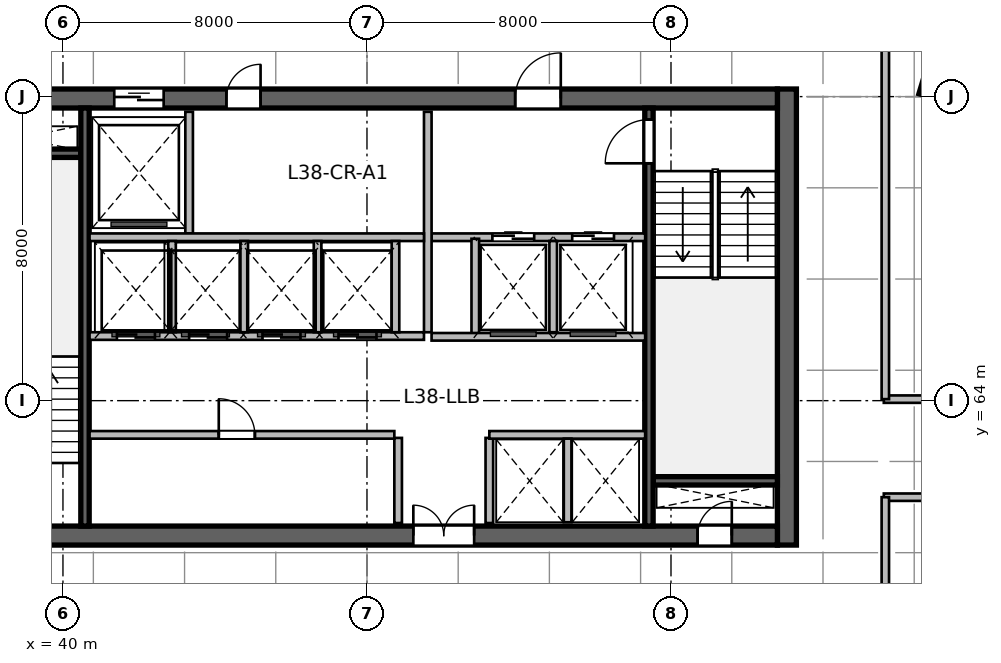
"""IFC4 building model, lengths in metres.
Left out: names, types, materials, properties, quantities, classifications, styles, units other than length and angle.
Written with IfcOpenShell. Run it as: python <this file> out.ifc"""

import sys

from ifc_helpers import new_model, si_unit, direction, frame, frame_2d, origin, origin_2d, place, context, subcontext, project, spatial, rectangle, extrude, source, transform, mapped, element, fill, save


model = new_model("IFC4")
c1 = context("Model", 3, precision=1e-05, world=origin(), true_north=direction((0.0, 1.0)))
c2 = subcontext(c1, "Body", "Model", "MODEL_VIEW")
j1 = project(units=[si_unit("LENGTHUNIT", "METRE"), si_unit("PLANEANGLEUNIT", "RADIAN")], contexts=[c1])
p1 = place(None, origin())
s1 = spatial("IfcSite", under=j1, at=p1, CompositionType="ELEMENT")
p2 = place(p1, origin())
s2 = spatial("IfcBuilding", under=s1, at=p2, CompositionType="ELEMENT")
p3 = place(p2, frame((0.0, 0.0, 158.4)))
s3 = spatial("IfcBuildingStorey", under=s2, at=p3, CompositionType="ELEMENT", Elevation=158.4)
m1 = source(origin(), c2, "Body", "SweptSolid", [
    extrude(rectangle(XDim=12.0, YDim=0.5, at=frame_2d((6.0, 0.0))), origin(), (0.0, 0.0, 1.0), 3.9),
])
p4 = place(p3, frame((59.05, 60.2, 0.0), z_axis=(0.0, 0.0, 1.0), x_axis=(0.0, 1.0, 0.0)))
e1 = element("IfcWall", 1, at=p4, inside=s3, PredefinedType="SHEAR", context=c2, shape_type="MappedRepresentation", body=[
    mapped(m1, transform((0.0, 0.0, 0.0), scale=1.0)),
])
m2 = source(origin(), c2, "Body", "SweptSolid", [
    extrude(rectangle(XDim=21.6, YDim=0.5, at=frame_2d((10.8, 0.0))), origin(), (0.0, 0.0, 1.0), 3.9),
])
p5 = place(p3, frame((37.2, 60.45, 0.0), z_axis=(0.0, 0.0, 1.0), x_axis=(1.0, 0.0, 0.0)))
e2 = element("IfcWall", 2, at=p5, inside=s3, PredefinedType="SHEAR", context=c2, shape_type="MappedRepresentation", body=[
    mapped(m2, transform((0.0, 0.0, 0.0), scale=1.0)),
])
p6 = place(p5, frame((1.1, 0.0, 0.0)))
e3 = element("IfcOpeningElement", 3, at=p6, cuts=e2, PredefinedType="OPENING", context=c2, shape_type="SweptSolid", body=[
    extrude(rectangle(XDim=1.15, YDim=2.15, at=frame_2d((0.575, 1.075))), frame((0.0, 0.26, 0.0), z_axis=(0.0, -1.0, 0.0), x_axis=(1.0, 0.0, 0.0)), (0.0, 0.0, 1.0), 0.52),
])
p7 = place(p5, frame((19.5, 0.0, 0.0)))
e4 = element("IfcOpeningElement", 4, at=p7, cuts=e2, PredefinedType="OPENING", context=c2, shape_type="SweptSolid", body=[
    extrude(rectangle(XDim=0.9, YDim=2.1, at=frame_2d((0.45, 1.05))), frame((0.0, 0.26, 0.0), z_axis=(0.0, -1.0, 0.0), x_axis=(1.0, 0.0, 0.0)), (0.0, 0.0, 1.0), 0.52),
])
p8 = place(p5, frame((12.02, 0.0, 0.0)))
e5 = element("IfcOpeningElement", 5, at=p8, cuts=e2, PredefinedType="OPENING", context=c2, shape_type="SweptSolid", body=[
    extrude(rectangle(XDim=1.6, YDim=2.15, at=frame_2d((0.8, 1.075))), frame((0.0, 0.26, 0.0), z_axis=(0.0, -1.0, 0.0), x_axis=(1.0, 0.0, 0.0)), (0.0, 0.0, 1.0), 0.52),
])
p9 = place(p3, frame((37.2, 71.95, 0.0), z_axis=(0.0, 0.0, 1.0), x_axis=(1.0, 0.0, 0.0)))
e6 = element("IfcWall", 6, at=p9, inside=s3, PredefinedType="SHEAR", context=c2, shape_type="MappedRepresentation", body=[
    mapped(m2, transform((0.0, 0.0, 0.0), scale=1.0)),
])
p10 = place(p9, frame((1.2, 0.0, 0.0)))
e7 = element("IfcOpeningElement", 7, at=p10, cuts=e6, PredefinedType="OPENING", context=c2, shape_type="SweptSolid", body=[
    extrude(rectangle(XDim=0.9, YDim=2.1, at=frame_2d((0.45, 1.05))), frame((0.0, 0.26, 0.0), z_axis=(0.0, -1.0, 0.0), x_axis=(1.0, 0.0, 0.0)), (0.0, 0.0, 1.0), 0.52),
])
p11 = place(p9, frame((14.7, 0.0, 0.0)))
e8 = element("IfcOpeningElement", 8, at=p11, cuts=e6, PredefinedType="OPENING", context=c2, shape_type="SweptSolid", body=[
    extrude(rectangle(XDim=1.2, YDim=2.15, at=frame_2d((0.6, 1.075))), frame((0.0, 0.26, 0.0), z_axis=(0.0, -1.0, 0.0), x_axis=(1.0, 0.0, 0.0)), (0.0, 0.0, 1.0), 0.52),
])
p12 = place(p9, frame((4.15, 0.0, 0.0)))
e9 = element("IfcOpeningElement", 9, at=p12, cuts=e6, PredefinedType="OPENING", context=c2, shape_type="SweptSolid", body=[
    extrude(rectangle(XDim=1.3, YDim=2.15, at=frame_2d((0.65, 1.075))), frame((0.0, 0.26, 0.0), z_axis=(0.0, -1.0, 0.0), x_axis=(1.0, 0.0, 0.0)), (0.0, 0.0, 1.0), 0.52),
])
p13 = place(p9, frame((7.1, 0.0, 0.0)))
e10 = element("IfcOpeningElement", 10, at=p13, cuts=e6, PredefinedType="OPENING", context=c2, shape_type="SweptSolid", body=[
    extrude(rectangle(XDim=0.9, YDim=2.1, at=frame_2d((0.45, 1.05))), frame((0.0, 0.26, 0.0), z_axis=(0.0, -1.0, 0.0), x_axis=(1.0, 0.0, 0.0)), (0.0, 0.0, 1.0), 0.52),
])
m3 = source(origin(), c2, "Body", "SweptSolid", [
    extrude(rectangle(XDim=3.27, YDim=0.22, at=frame_2d((1.635, 0.0))), origin(), (0.0, 0.0, 1.0), 3.9),
])
for number, where, z_axis, x_axis in (
    (11, (37.2, 70.51, 0.0), (0.0, 0.0, 1.0), (1.0, 0.0, 0.0)),
    (12, (55.53, 61.89, 0.0), (0.0, 0.0, 1.0), (1.0, 0.0, 0.0)),
):
    element("IfcWall", number, at=place(p3, frame(where, z_axis=z_axis, x_axis=x_axis)), inside=s3, PredefinedType="SHEAR", context=c2, shape_type="MappedRepresentation", body=[
        mapped(m3, transform((0.0, 0.0, 0.0), scale=1.0)),
    ])
m4 = source(origin(), c2, "Body", "SweptSolid", [
    extrude(rectangle(XDim=11.0, YDim=0.22, at=frame_2d((5.5, 0.0))), origin(), (0.0, 0.0, 1.0), 3.9),
])
p14 = place(p3, frame((40.58, 60.7, 0.0), z_axis=(0.0, 0.0, 1.0), x_axis=(0.0, 1.0, 0.0)))
e13 = element("IfcWall", 13, at=p14, inside=s3, PredefinedType="SHEAR", context=c2, shape_type="MappedRepresentation", body=[
    mapped(m4, transform((0.0, 0.0, 0.0), scale=1.0)),
])
p15 = place(p3, frame((55.42, 60.7, 0.0), z_axis=(0.0, 0.0, 1.0), x_axis=(0.0, 1.0, 0.0)))
e14 = element("IfcWall", 14, at=p15, inside=s3, PredefinedType="SHEAR", context=c2, shape_type="MappedRepresentation", body=[
    mapped(m4, transform((0.0, 0.0, 0.0), scale=1.0)),
])
p16 = place(p15, frame((9.545, 0.0, 0.0)))
e15 = element("IfcOpeningElement", 15, at=p16, cuts=e14, PredefinedType="OPENING", context=c2, shape_type="SweptSolid", body=[
    extrude(rectangle(XDim=1.15, YDim=2.15, at=frame_2d((0.575, 1.075))), frame((0.0, 0.12, 0.0), z_axis=(0.0, -1.0, 0.0), x_axis=(1.0, 0.0, 0.0)), (0.0, 0.0, 1.0), 0.24),
])
m5 = source(origin(), c2, "Body", "SweptSolid", [
    extrude(rectangle(XDim=1.1, YDim=1.1, at=origin_2d()), origin(), (0.0, 0.0, 1.0), 3.9),
])
p17 = place(p3, frame((63.209, 72.442, 0.0), z_axis=(0.0, 0.0, 1.0), x_axis=(0.288697611798, 0.957420330337, 0.0)))
e16 = element("IfcColumn", 16, at=p17, inside=s3, PredefinedType="COLUMN", context=c2, shape_type="MappedRepresentation", body=[
    mapped(m5, transform((0.0, 0.0, 0.0), scale=1.0)),
])
m6 = source(origin(), c2, "Body", "SweptSolid", [
    extrude(rectangle(XDim=2.24, YDim=0.2, at=frame_2d((1.12, 0.0))), origin(), (0.0, 0.0, 1.0), 3.65),
])
for number, where, z_axis, x_axis in (
    (17, (48.82, 60.78, 0.0), (0.0, 0.0, 1.0), (0.0, 1.0, 0.0)),
    (18, (51.22, 60.78, 0.0), (0.0, 0.0, 1.0), (0.0, 1.0, 0.0)),
):
    element("IfcWall", number, at=place(p3, frame(where, z_axis=z_axis, x_axis=x_axis)), inside=s3, PredefinedType="SOLIDWALL", context=c2, shape_type="MappedRepresentation", body=[
        mapped(m6, transform((0.0, 0.0, 0.0), scale=1.0)),
    ])
m7 = source(origin(), c2, "Body", "SweptSolid", [
    extrude(rectangle(XDim=5.62, YDim=0.2, at=frame_2d((2.81, 0.0))), origin(), (0.0, 0.0, 1.0), 3.65),
])
p18 = place(p3, frame((49.7, 68.3, 0.0), z_axis=(0.0, 0.0, 1.0), x_axis=(1.0, 0.0, 0.0)))
e19 = element("IfcWall", 19, at=p18, inside=s3, PredefinedType="SOLIDWALL", context=c2, shape_type="MappedRepresentation", body=[
    mapped(m7, transform((0.0, 0.0, 0.0), scale=1.0)),
])
p19 = place(p18, frame((1.6, 0.0, 0.0)))
e20 = element("IfcOpeningElement", 20, at=p19, cuts=e19, PredefinedType="OPENING", context=c2, shape_type="SweptSolid", body=[
    extrude(rectangle(XDim=1.1, YDim=2.15, at=frame_2d((0.55, 1.075))), frame((0.0, 0.11, 0.0), z_axis=(0.0, -1.0, 0.0), x_axis=(1.0, 0.0, 0.0)), (0.0, 0.0, 1.0), 0.22),
])
p20 = place(p18, frame((3.7, 0.0, 0.0)))
e21 = element("IfcOpeningElement", 21, at=p20, cuts=e19, PredefinedType="OPENING", context=c2, shape_type="SweptSolid", body=[
    extrude(rectangle(XDim=1.1, YDim=2.15, at=frame_2d((0.55, 1.075))), frame((0.0, 0.11, 0.0), z_axis=(0.0, -1.0, 0.0), x_axis=(1.0, 0.0, 0.0)), (0.0, 0.0, 1.0), 0.22),
])
m8 = source(origin(), c2, "Body", "SweptSolid", [
    extrude(rectangle(XDim=5.8, YDim=0.2, at=frame_2d((2.9, 0.0))), origin(), (0.0, 0.0, 1.0), 3.65),
])
p21 = place(p3, frame((49.6, 65.8, 0.0), z_axis=(0.0, 0.0, 1.0), x_axis=(0.0, 1.0, 0.0)))
e22 = element("IfcWall", 22, at=p21, inside=s3, PredefinedType="SOLIDWALL", context=c2, shape_type="MappedRepresentation", body=[
    mapped(m8, transform((0.0, 0.0, 0.0), scale=1.0)),
])
m9 = source(origin(), c2, "Body", "SweptSolid", [
    extrude(rectangle(XDim=2.58, YDim=0.2, at=frame_2d((1.29, 0.0))), origin(), (0.0, 0.0, 1.0), 3.65),
])
p22 = place(p3, frame((50.85, 65.68, 0.0), z_axis=(0.0, 0.0, 1.0), x_axis=(0.0, 1.0, 0.0)))
e23 = element("IfcWall", 23, at=p22, inside=s3, PredefinedType="SOLIDWALL", context=c2, shape_type="MappedRepresentation", body=[
    mapped(m9, transform((0.0, 0.0, 0.0), scale=1.0)),
])
m10 = source(origin(), c2, "Body", "SweptSolid", [
    extrude(rectangle(XDim=2.4, YDim=0.2, at=frame_2d((1.2, 0.0))), origin(), (0.0, 0.0, 1.0), 3.65),
])
p23 = place(p3, frame((52.9, 65.8, 0.0), z_axis=(0.0, 0.0, 1.0), x_axis=(0.0, 1.0, 0.0)))
e24 = element("IfcWall", 24, at=p23, inside=s3, PredefinedType="SOLIDWALL", context=c2, shape_type="MappedRepresentation", body=[
    mapped(m10, transform((0.0, 0.0, 0.0), scale=1.0)),
])
p24 = place(p3, frame((49.7, 65.68, 0.0), z_axis=(0.0, 0.0, 1.0), x_axis=(1.0, 0.0, 0.0)))
e25 = element("IfcWall", 25, at=p24, inside=s3, PredefinedType="SOLIDWALL", context=c2, shape_type="MappedRepresentation", body=[
    mapped(m7, transform((0.0, 0.0, 0.0), scale=1.0)),
])
m11 = source(origin(), c2, "Body", "SweptSolid", [
    extrude(rectangle(XDim=3.2, YDim=0.2, at=frame_2d((1.6, 0.0))), origin(), (0.0, 0.0, 1.0), 3.65),
])
p25 = place(p3, frame((43.32, 68.4, 0.0), z_axis=(0.0, 0.0, 1.0), x_axis=(0.0, 1.0, 0.0)))
e26 = element("IfcWall", 26, at=p25, inside=s3, PredefinedType="SOLIDWALL", context=c2, shape_type="MappedRepresentation", body=[
    mapped(m11, transform((0.0, 0.0, 0.0), scale=1.0)),
])
m12 = source(origin(), c2, "Body", "SweptSolid", [
    extrude(rectangle(XDim=8.8, YDim=0.2, at=frame_2d((4.4, 0.0))), origin(), (0.0, 0.0, 1.0), 3.65),
])
p26 = place(p3, frame((40.7, 68.3, 0.0), z_axis=(0.0, 0.0, 1.0), x_axis=(1.0, 0.0, 0.0)))
e27 = element("IfcWall", 27, at=p26, inside=s3, PredefinedType="SOLIDWALL", context=c2, shape_type="MappedRepresentation", body=[
    mapped(m12, transform((0.0, 0.0, 0.0), scale=1.0)),
])
m13 = source(origin(), c2, "Body", "SweptSolid", [
    extrude(rectangle(XDim=8.02, YDim=0.2, at=frame_2d((4.01, 0.0))), origin(), (0.0, 0.0, 1.0), 3.65),
])
p27 = place(p3, frame((40.7, 63.1, 0.0), z_axis=(0.0, 0.0, 1.0), x_axis=(1.0, 0.0, 0.0)))
e28 = element("IfcWall", 28, at=p27, inside=s3, PredefinedType="SOLIDWALL", context=c2, shape_type="MappedRepresentation", body=[
    mapped(m13, transform((0.0, 0.0, 0.0), scale=1.0)),
])
p28 = place(p27, frame((3.4, 0.0, 0.0)))
e29 = element("IfcOpeningElement", 29, at=p28, cuts=e28, PredefinedType="OPENING", context=c2, shape_type="SweptSolid", body=[
    extrude(rectangle(XDim=0.95, YDim=2.15, at=frame_2d((0.475, 1.075))), frame((0.0, 0.11, 0.0), z_axis=(0.0, -1.0, 0.0), x_axis=(1.0, 0.0, 0.0)), (0.0, 0.0, 1.0), 0.22),
])
m14 = source(origin(), c2, "Body", "SweptSolid", [
    extrude(rectangle(XDim=4.1, YDim=0.2, at=frame_2d((2.05, 0.0))), origin(), (0.0, 0.0, 1.0), 3.65),
])
p29 = place(p3, frame((51.22, 63.1, 0.0), z_axis=(0.0, 0.0, 1.0), x_axis=(1.0, 0.0, 0.0)))
e30 = element("IfcWall", 30, at=p29, inside=s3, PredefinedType="SOLIDWALL", context=c2, shape_type="MappedRepresentation", body=[
    mapped(m14, transform((0.0, 0.0, 0.0), scale=1.0)),
])
m15 = source(origin(), c2, "Body", "SweptSolid", [
    extrude(rectangle(XDim=2.2, YDim=0.2, at=frame_2d((1.1, 0.0))), origin(), (0.0, 0.0, 1.0), 3.65),
])
p30 = place(p3, frame((53.28, 60.8, 0.0), z_axis=(0.0, 0.0, 1.0), x_axis=(0.0, 1.0, 0.0)))
e31 = element("IfcWall", 31, at=p30, inside=s3, PredefinedType="SOLIDWALL", context=c2, shape_type="MappedRepresentation", body=[
    mapped(m15, transform((0.0, 0.0, 0.0), scale=1.0)),
])
p31 = place(p3, frame((40.7, 65.7, 0.0), z_axis=(0.0, 0.0, 1.0), x_axis=(1.0, 0.0, 0.0)))
e32 = element("IfcWall", 32, at=p31, inside=s3, PredefinedType="SOLIDWALL", context=c2, shape_type="MappedRepresentation", body=[
    mapped(m12, transform((0.0, 0.0, 0.0), scale=1.0)),
])
p32 = place(p31, frame((0.72, 0.0, 0.0)))
e33 = element("IfcOpeningElement", 33, at=p32, cuts=e32, PredefinedType="OPENING", context=c2, shape_type="SweptSolid", body=[
    extrude(rectangle(XDim=1.0, YDim=2.15, at=frame_2d((0.5, 1.075))), frame((0.0, 0.11, 0.0), z_axis=(0.0, -1.0, 0.0), x_axis=(1.0, 0.0, 0.0)), (0.0, 0.0, 1.0), 0.22),
])
p33 = place(p31, frame((2.62, 0.0, 0.0)))
e34 = element("IfcOpeningElement", 34, at=p33, cuts=e32, PredefinedType="OPENING", context=c2, shape_type="SweptSolid", body=[
    extrude(rectangle(XDim=1.0, YDim=2.15, at=frame_2d((0.5, 1.075))), frame((0.0, 0.11, 0.0), z_axis=(0.0, -1.0, 0.0), x_axis=(1.0, 0.0, 0.0)), (0.0, 0.0, 1.0), 0.22),
])
p34 = place(p31, frame((4.55, 0.0, 0.0)))
e35 = element("IfcOpeningElement", 35, at=p34, cuts=e32, PredefinedType="OPENING", context=c2, shape_type="SweptSolid", body=[
    extrude(rectangle(XDim=1.0, YDim=2.15, at=frame_2d((0.5, 1.075))), frame((0.0, 0.11, 0.0), z_axis=(0.0, -1.0, 0.0), x_axis=(1.0, 0.0, 0.0)), (0.0, 0.0, 1.0), 0.22),
])
p35 = place(p31, frame((6.55, 0.0, 0.0)))
e36 = element("IfcOpeningElement", 36, at=p35, cuts=e32, PredefinedType="OPENING", context=c2, shape_type="SweptSolid", body=[
    extrude(rectangle(XDim=1.0, YDim=2.15, at=frame_2d((0.5, 1.075))), frame((0.0, 0.11, 0.0), z_axis=(0.0, -1.0, 0.0), x_axis=(1.0, 0.0, 0.0)), (0.0, 0.0, 1.0), 0.22),
])
for number, where, z_axis, x_axis in (
    (37, (48.75, 65.8, 0.0), (0.0, 0.0, 1.0), (0.0, 1.0, 0.0)),
    (38, (42.87, 65.8, 0.0), (0.0, 0.0, 1.0), (0.0, 1.0, 0.0)),
    (39, (44.77, 65.8, 0.0), (0.0, 0.0, 1.0), (0.0, 1.0, 0.0)),
    (40, (46.7, 65.8, 0.0), (0.0, 0.0, 1.0), (0.0, 1.0, 0.0)),
):
    element("IfcWall", number, at=place(p3, frame(where, z_axis=z_axis, x_axis=x_axis)), inside=s3, PredefinedType="SOLIDWALL", context=c2, shape_type="MappedRepresentation", body=[
        mapped(m10, transform((0.0, 0.0, 0.0), scale=1.0)),
    ])
m16 = source(origin(), c2, "Body", "SweptSolid", [
    extrude(rectangle(XDim=11.22, YDim=0.195, at=frame_2d((5.61, 0.0))), origin(), (0.0, 0.0, 1.0), 3.65),
])
p36 = place(p3, frame((61.6, 64.04, 0.0), z_axis=(0.0, 0.0, 1.0), x_axis=(1.0, 0.0, 0.0)))
e41 = element("IfcWall", 41, at=p36, inside=s3, PredefinedType="PARTITIONING", context=c2, shape_type="MappedRepresentation", body=[
    mapped(m16, transform((0.0, 0.0, 0.0), scale=1.0)),
])
p37 = place(p36, frame((5.135, 0.0, 0.0)))
e42 = element("IfcOpeningElement", 42, at=p37, cuts=e41, PredefinedType="OPENING", context=c2, shape_type="SweptSolid", body=[
    extrude(rectangle(XDim=0.95, YDim=2.1, at=frame_2d((0.475, 1.05))), frame((0.0, 0.107, 0.0), z_axis=(0.0, -1.0, 0.0), x_axis=(1.0, 0.0, 0.0)), (0.0, 0.0, 1.0), 0.215),
])
p38 = place(p3, frame((61.6, 61.46, 0.0), z_axis=(0.0, 0.0, 1.0), x_axis=(1.0, 0.0, 0.0)))
e43 = element("IfcWall", 43, at=p38, inside=s3, PredefinedType="PARTITIONING", context=c2, shape_type="MappedRepresentation", body=[
    mapped(m16, transform((0.0, 0.0, 0.0), scale=1.0)),
])
p39 = place(p38, frame((5.135, 0.0, 0.0)))
e44 = element("IfcOpeningElement", 44, at=p39, cuts=e43, PredefinedType="OPENING", context=c2, shape_type="SweptSolid", body=[
    extrude(rectangle(XDim=0.95, YDim=2.1, at=frame_2d((0.475, 1.05))), frame((0.0, 0.107, 0.0), z_axis=(0.0, -1.0, 0.0), x_axis=(1.0, 0.0, 0.0)), (0.0, 0.0, 1.0), 0.215),
])
m17 = source(origin(), c2, "Body", "SweptSolid", [
    extrude(rectangle(XDim=12.126, YDim=0.195, at=frame_2d((6.063, 0.0))), origin(), (0.0, 0.0, 1.0), 2.942),
])
p40 = place(p3, frame((61.64, 49.334, 0.0), z_axis=(0.0, 0.0, 1.0), x_axis=(0.0, 1.0, 0.0)))
e45 = element("IfcWall", 45, at=p40, inside=s3, PredefinedType="PARTITIONING", context=c2, shape_type="MappedRepresentation", body=[
    mapped(m17, transform((0.0, 0.0, 0.0), scale=1.0)),
])
m18 = source(origin(), c2, "Body", "SweptSolid", [
    extrude(rectangle(XDim=10.346, YDim=0.195, at=frame_2d((5.173, 0.0))), origin(), (0.0, 0.0, 1.0), 3.65),
])
p41 = place(p3, frame((61.64, 64.04, 0.0), z_axis=(0.0, 0.0, 1.0), x_axis=(0.0, 1.0, 0.0)))
e46 = element("IfcWall", 46, at=p41, inside=s3, PredefinedType="PARTITIONING", context=c2, shape_type="MappedRepresentation", body=[
    mapped(m18, transform((0.0, 0.0, 0.0), scale=1.0)),
])
m19 = source(origin(), c2, "Body", "SweptSolid", [
    extrude(rectangle(XDim=0.9, YDim=2.1, at=frame_2d((0.45, 1.05))), frame((0.0, 0.025, 0.0), z_axis=(0.0, -1.0, 0.0), x_axis=(1.0, 0.0, 0.0)), (0.0, 0.0, 1.0), 0.05),
])
p42 = place(p7, origin())
e47 = element("IfcDoor", 47, at=p42, inside=s3, OperationType="SINGLE_SWING_RIGHT", PredefinedType="DOOR", context=c2, shape_type="MappedRepresentation", body=[
    mapped(m19, transform((0.0, 0.0, 0.0), scale=1.0)),
])
fill(e4, e47)
m20 = source(origin(), c2, "Body", "SweptSolid", [
    extrude(rectangle(XDim=1.15, YDim=2.15, at=frame_2d((0.575, 1.075))), frame((0.0, 0.025, 0.0), z_axis=(0.0, -1.0, 0.0), x_axis=(1.0, 0.0, 0.0)), (0.0, 0.0, 1.0), 0.05),
])
p43 = place(p16, origin())
e48 = element("IfcDoor", 48, at=p43, inside=s3, OperationType="SINGLE_SWING_LEFT", PredefinedType="DOOR", context=c2, shape_type="MappedRepresentation", body=[
    mapped(m20, transform((0.0, 0.0, 0.0), scale=1.0)),
])
fill(e15, e48)
m21 = source(origin(), c2, "Body", "SweptSolid", [
    extrude(rectangle(XDim=1.6, YDim=2.15, at=frame_2d((0.8, 1.075))), frame((0.0, 0.025, 0.0), z_axis=(0.0, -1.0, 0.0), x_axis=(1.0, 0.0, 0.0)), (0.0, 0.0, 1.0), 0.05),
])
p44 = place(p8, origin())
e49 = element("IfcDoor", 49, at=p44, inside=s3, OperationType="DOUBLE_DOOR_SINGLE_SWING", PredefinedType="DOOR", context=c2, shape_type="MappedRepresentation", body=[
    mapped(m21, transform((0.0, 0.0, 0.0), scale=1.0)),
])
fill(e5, e49)
m22 = source(origin(), c2, "Body", "SweptSolid", [
    extrude(rectangle(XDim=1.2, YDim=2.15, at=frame_2d((0.6, 1.075))), frame((0.0, 0.025, 0.0), z_axis=(0.0, -1.0, 0.0), x_axis=(1.0, 0.0, 0.0)), (0.0, 0.0, 1.0), 0.05),
])
p45 = place(p11, origin())
e50 = element("IfcDoor", 50, at=p45, inside=s3, OperationType="SINGLE_SWING_RIGHT", PredefinedType="DOOR", context=c2, shape_type="MappedRepresentation", body=[
    mapped(m22, transform((0.0, 0.0, 0.0), scale=1.0)),
])
fill(e8, e50)
m23 = source(origin(), c2, "Body", "SweptSolid", [
    extrude(rectangle(XDim=1.1, YDim=2.15, at=frame_2d((0.55, 1.075))), frame((0.0, 0.025, 0.0), z_axis=(0.0, -1.0, 0.0), x_axis=(1.0, 0.0, 0.0)), (0.0, 0.0, 1.0), 0.05),
])
p46 = place(p19, origin())
e51 = element("IfcDoor", 51, at=p46, inside=s3, OperationType="DOUBLE_DOOR_SLIDING", PredefinedType="DOOR", context=c2, shape_type="MappedRepresentation", body=[
    mapped(m23, transform((0.0, 0.0, 0.0), scale=1.0)),
])
fill(e20, e51)
p47 = place(p20, origin())
e52 = element("IfcDoor", 52, at=p47, inside=s3, OperationType="DOUBLE_DOOR_SLIDING", PredefinedType="DOOR", context=c2, shape_type="MappedRepresentation", body=[
    mapped(m23, transform((0.0, 0.0, 0.0), scale=1.0)),
])
fill(e21, e52)
m24 = source(origin(), c2, "Body", "SweptSolid", [
    extrude(rectangle(XDim=1.3, YDim=2.15, at=frame_2d((0.65, 1.075))), frame((0.0, 0.025, 0.0), z_axis=(0.0, -1.0, 0.0), x_axis=(1.0, 0.0, 0.0)), (0.0, 0.0, 1.0), 0.05),
])
p48 = place(p12, origin())
e53 = element("IfcDoor", 53, at=p48, inside=s3, OperationType="DOUBLE_DOOR_SLIDING", PredefinedType="DOOR", context=c2, shape_type="MappedRepresentation", body=[
    mapped(m24, transform((0.0, 0.0, 0.0), scale=1.0)),
])
fill(e9, e53)
p49 = place(p13, origin())
e54 = element("IfcDoor", 54, at=p49, inside=s3, OperationType="SINGLE_SWING_RIGHT", PredefinedType="DOOR", context=c2, shape_type="MappedRepresentation", body=[
    mapped(m19, transform((0.0, 0.0, 0.0), scale=1.0)),
])
fill(e10, e54)
m25 = source(origin(), c2, "Body", "SweptSolid", [
    extrude(rectangle(XDim=0.95, YDim=2.15, at=frame_2d((0.475, 1.075))), frame((0.0, 0.025, 0.0), z_axis=(0.0, -1.0, 0.0), x_axis=(1.0, 0.0, 0.0)), (0.0, 0.0, 1.0), 0.05),
])
p50 = place(p28, origin())
e55 = element("IfcDoor", 55, at=p50, inside=s3, OperationType="SINGLE_SWING_LEFT", PredefinedType="DOOR", context=c2, shape_type="MappedRepresentation", body=[
    mapped(m25, transform((0.0, 0.0, 0.0), scale=1.0)),
])
fill(e29, e55)
m26 = source(origin(), c2, "Body", "SweptSolid", [
    extrude(rectangle(XDim=1.0, YDim=2.15, at=frame_2d((0.5, 1.075))), frame((0.0, 0.025, 0.0), z_axis=(0.0, -1.0, 0.0), x_axis=(1.0, 0.0, 0.0)), (0.0, 0.0, 1.0), 0.05),
])
p51 = place(p32, origin())
e56 = element("IfcDoor", 56, at=p51, inside=s3, OperationType="DOUBLE_DOOR_SLIDING", PredefinedType="DOOR", context=c2, shape_type="MappedRepresentation", body=[
    mapped(m26, transform((0.0, 0.0, 0.0), scale=1.0)),
])
fill(e33, e56)
p52 = place(p33, origin())
e57 = element("IfcDoor", 57, at=p52, inside=s3, OperationType="DOUBLE_DOOR_SLIDING", PredefinedType="DOOR", context=c2, shape_type="MappedRepresentation", body=[
    mapped(m26, transform((0.0, 0.0, 0.0), scale=1.0)),
])
fill(e34, e57)
p53 = place(p34, origin())
e58 = element("IfcDoor", 58, at=p53, inside=s3, OperationType="DOUBLE_DOOR_SLIDING", PredefinedType="DOOR", context=c2, shape_type="MappedRepresentation", body=[
    mapped(m26, transform((0.0, 0.0, 0.0), scale=1.0)),
])
fill(e35, e58)
p54 = place(p35, origin())
e59 = element("IfcDoor", 59, at=p54, inside=s3, OperationType="DOUBLE_DOOR_SLIDING", PredefinedType="DOOR", context=c2, shape_type="MappedRepresentation", body=[
    mapped(m26, transform((0.0, 0.0, 0.0), scale=1.0)),
])
fill(e36, e59)
save(model, sys.argv[1])
